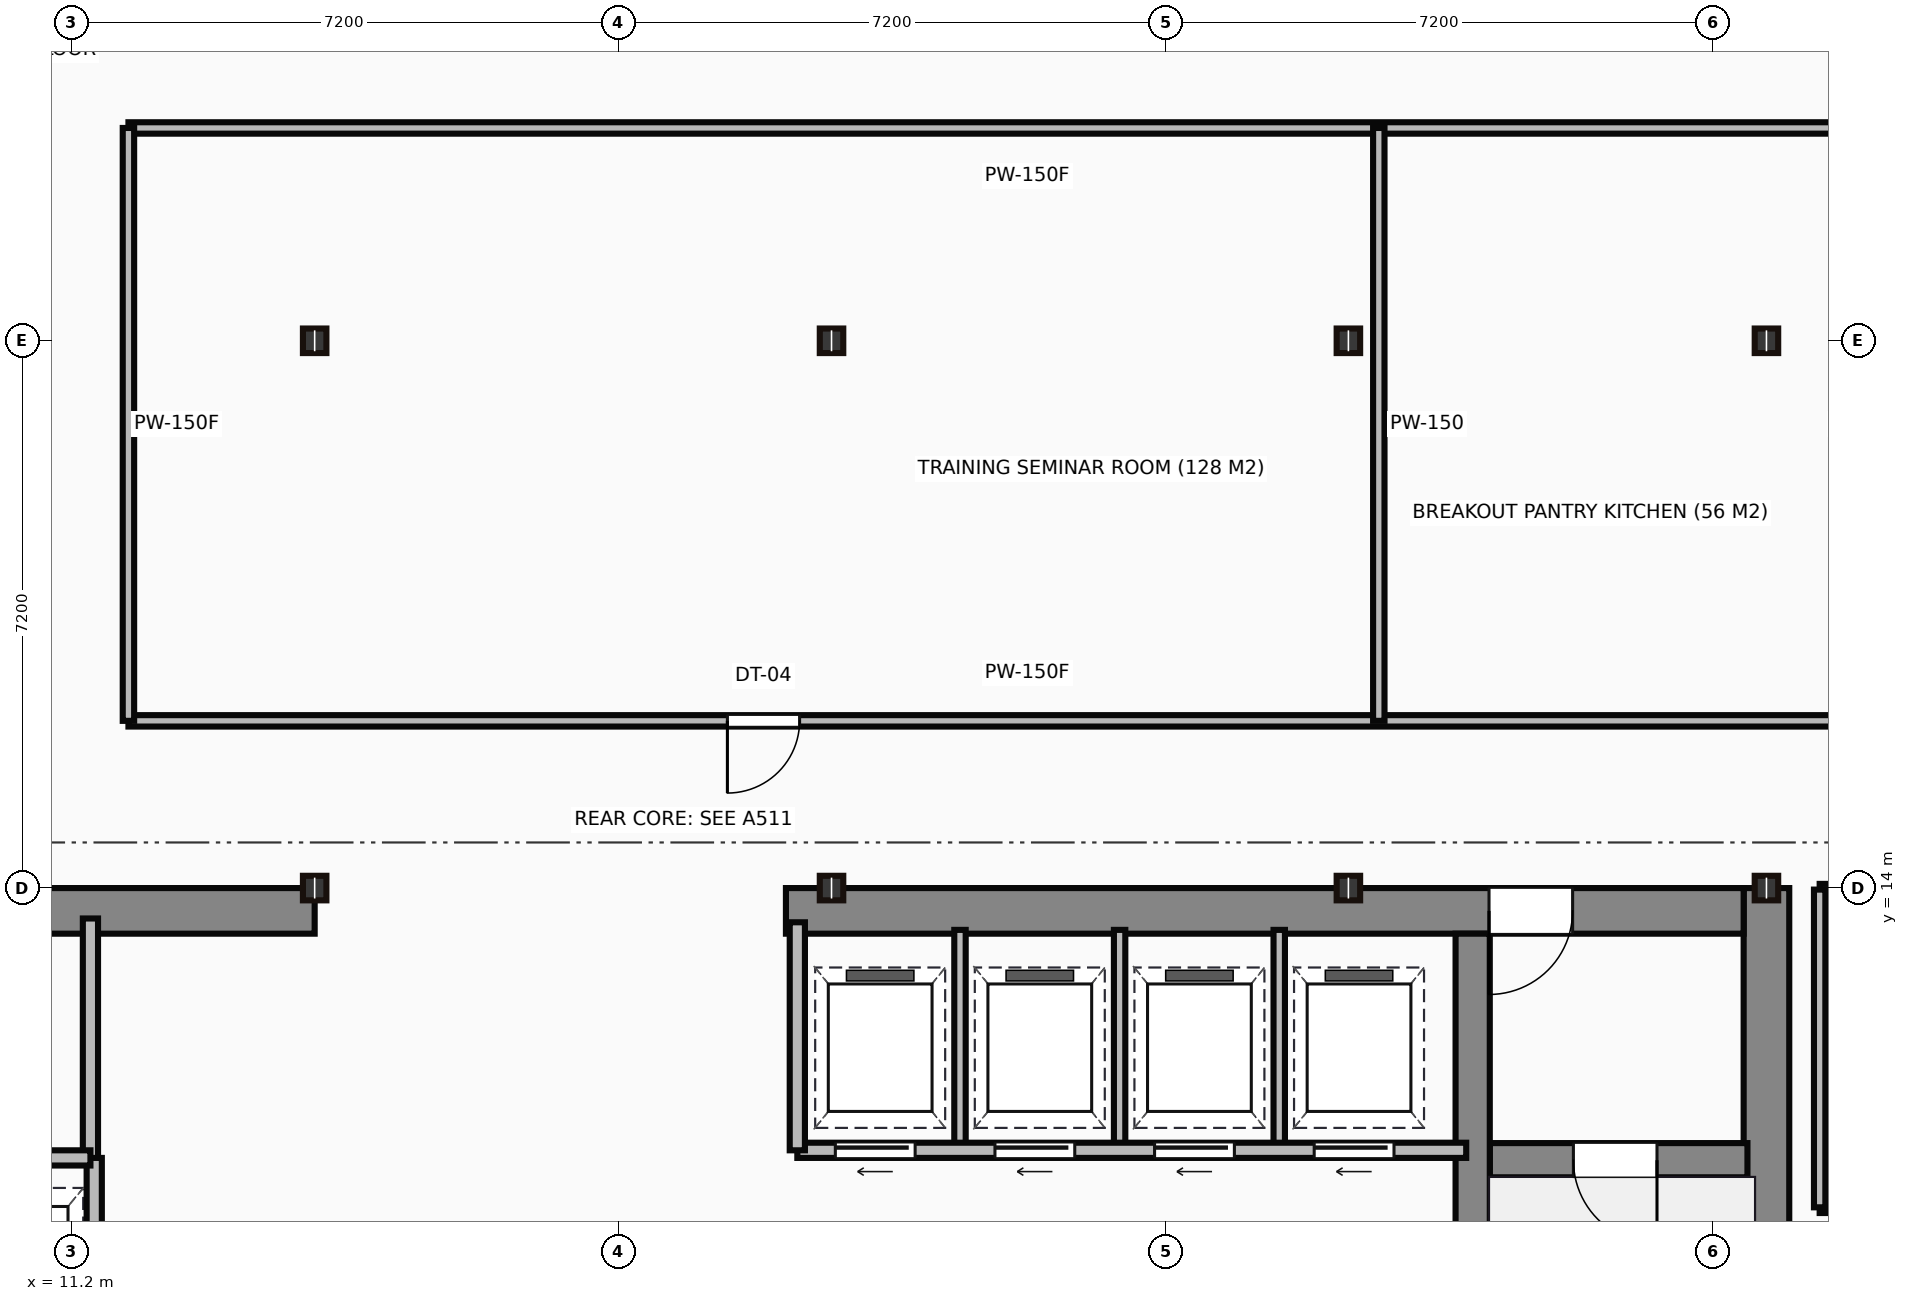
"""IFC4 building model, lengths in metres.
Left out: names, types, materials, properties, quantities, classifications, styles, units other than length and angle.
Written with IfcOpenShell. Run it as: python <this file> out.ifc"""

import sys

from ifc_helpers import new_model, si_unit, direction, frame, frame_2d, origin, origin_2d, place, context, subcontext, project, spatial, rectangle, i_section, extrude, source, transform, mapped, element, fill, save


model = new_model("IFC4")
c1 = context("Model", 3, precision=1e-05, world=origin(), true_north=direction((0.0, 1.0)))
c2 = subcontext(c1, "Body", "Model", "MODEL_VIEW")
j1 = project(units=[si_unit("LENGTHUNIT", "METRE"), si_unit("PLANEANGLEUNIT", "RADIAN")], contexts=[c1])
p1 = place(None, origin())
s1 = spatial("IfcSite", under=j1, at=p1, CompositionType="ELEMENT")
p2 = place(p1, origin())
s2 = spatial("IfcBuilding", under=s1, at=p2, CompositionType="ELEMENT")
p3 = place(p2, frame((0.0, 0.0, 266.1)))
s3 = spatial("IfcBuildingStorey", under=s2, at=p3, CompositionType="ELEMENT", Elevation=266.1)
m1 = source(origin(), c2, "Body", "SweptSolid", [
    extrude(rectangle(XDim=13.1, YDim=0.6, at=frame_2d((6.55, 0.0))), origin(), (0.0, 0.0, 1.0), 3.65),
])
p4 = place(p3, frame((33.5, 0.9, 0.0), z_axis=(0.0, 0.0, 1.0), x_axis=(0.0, 1.0, 0.0)))
e1 = element("IfcWall", 1, at=p4, inside=s3, PredefinedType="SHEAR", context=c2, shape_type="MappedRepresentation", body=[
    mapped(m1, transform((0.0, 0.0, 0.0))),
])
m2 = source(origin(), c2, "Body", "SweptSolid", [
    extrude(rectangle(XDim=9.1, YDim=0.6, at=frame_2d((4.55, 0.0))), origin(), (0.0, 0.0, 1.0), 3.65),
])
p5 = place(p3, frame((5.3, 13.7, 0.0), z_axis=(0.0, 0.0, 1.0), x_axis=(1.0, 0.0, 0.0)))
e2 = element("IfcWall", 2, at=p5, inside=s3, PredefinedType="SHEAR", context=c2, shape_type="MappedRepresentation", body=[
    mapped(m2, transform((0.0, 0.0, 0.0))),
])
p6 = place(p5, frame((4.1, 0.0, 0.0)))
e3 = element("IfcOpeningElement", 3, at=p6, cuts=e2, PredefinedType="OPENING", context=c2, shape_type="SweptSolid", body=[
    extrude(rectangle(XDim=1.1, YDim=2.15, at=frame_2d((0.55, 1.075))), frame((0.0, 0.31, 0.0), z_axis=(0.0, -1.0, 0.0), x_axis=(1.0, 0.0, 0.0)), (0.0, 0.0, 1.0), 0.62),
])
m3 = source(origin(), c2, "Body", "SweptSolid", [
    extrude(rectangle(XDim=12.6, YDim=0.6, at=frame_2d((6.3, 0.0))), origin(), (0.0, 0.0, 1.0), 3.65),
])
p7 = place(p3, frame((20.6, 13.7, 0.0), z_axis=(0.0, 0.0, 1.0), x_axis=(1.0, 0.0, 0.0)))
e4 = element("IfcWall", 4, at=p7, inside=s3, PredefinedType="SHEAR", context=c2, shape_type="MappedRepresentation", body=[
    mapped(m3, transform((0.0, 0.0, 0.0))),
])
p8 = place(p7, frame((9.25, 0.0, 0.0)))
e5 = element("IfcOpeningElement", 5, at=p8, cuts=e4, PredefinedType="OPENING", context=c2, shape_type="SweptSolid", body=[
    extrude(rectangle(XDim=1.1, YDim=2.15, at=frame_2d((0.55, 1.075))), frame((0.0, 0.31, 0.0), z_axis=(0.0, -1.0, 0.0), x_axis=(1.0, 0.0, 0.0)), (0.0, 0.0, 1.0), 0.62),
])
m4 = source(origin(), c2, "Body", "SweptSolid", [
    extrude(rectangle(XDim=12.5, YDim=0.45, at=frame_2d((6.25, 0.0))), origin(), (0.0, 0.0, 1.0), 3.65),
])
p9 = place(p3, frame((29.635, 0.9, 0.0), z_axis=(0.0, 0.0, 1.0), x_axis=(0.0, 1.0, 0.0)))
e6 = element("IfcWall", 6, at=p9, inside=s3, PredefinedType="SHEAR", context=c2, shape_type="MappedRepresentation", body=[
    mapped(m4, transform((0.0, 0.0, 0.0))),
])
m5 = source(origin(), c2, "Body", "SweptSolid", [
    extrude(rectangle(XDim=3.39, YDim=0.45, at=frame_2d((1.695, 0.0))), origin(), (0.0, 0.0, 1.0), 3.65),
])
p10 = place(p3, frame((29.86, 10.42, 0.0), z_axis=(0.0, 0.0, 1.0), x_axis=(1.0, 0.0, 0.0)))
e7 = element("IfcWall", 7, at=p10, inside=s3, PredefinedType="SHEAR", context=c2, shape_type="MappedRepresentation", body=[
    mapped(m5, transform((0.0, 0.0, 0.0))),
])
p11 = place(p10, frame((1.1, 0.0, 0.0)))
e8 = element("IfcOpeningElement", 8, at=p11, cuts=e7, PredefinedType="OPENING", context=c2, shape_type="SweptSolid", body=[
    extrude(rectangle(XDim=1.1, YDim=2.15, at=frame_2d((0.55, 1.075))), frame((0.0, 0.235, 0.0), z_axis=(0.0, -1.0, 0.0), x_axis=(1.0, 0.0, 0.0)), (0.0, 0.0, 1.0), 0.47),
])
m6 = source(origin(), c2, "Body", "SweptSolid", [
    extrude(i_section(OverallWidth=0.309, OverallDepth=0.323, WebThickness=0.014, FlangeThickness=0.023, at=origin_2d()), origin(), (0.0, 0.0, 1.0), 3.65),
])
for number, where, z_axis, x_axis in (
    (9, (14.4, 14.0, 0.0), (0.0, 0.0, 1.0), (1.0, 0.0, 0.0)),
    (10, (14.4, 21.2, 0.0), (0.0, 0.0, 1.0), (1.0, 0.0, 0.0)),
    (11, (21.2, 14.0, 0.0), (0.0, 0.0, 1.0), (1.0, 0.0, 0.0)),
    (12, (21.2, 21.2, 0.0), (0.0, 0.0, 1.0), (1.0, 0.0, 0.0)),
    (13, (28.0, 14.0, 0.0), (0.0, 0.0, 1.0), (1.0, 0.0, 0.0)),
    (14, (28.0, 21.2, 0.0), (0.0, 0.0, 1.0), (1.0, 0.0, 0.0)),
    (15, (33.5, 14.0, 0.0), (0.0, 0.0, 1.0), (1.0, 0.0, 0.0)),
    (16, (33.5, 21.2, 0.0), (0.0, 0.0, 1.0), (1.0, 0.0, 0.0)),
):
    element("IfcColumn", number, at=place(p3, frame(where, z_axis=z_axis, x_axis=x_axis)), inside=s3, PredefinedType="COLUMN", context=c2, shape_type="MappedRepresentation", body=[
        mapped(m6, transform((0.0, 0.0, 0.0))),
    ])
m7 = source(origin(), c2, "Body", "SweptSolid", [
    extrude(rectangle(XDim=3.18, YDim=0.2, at=frame_2d((1.59, 0.0))), origin(), (0.0, 0.0, 1.0), 3.4),
])
p12 = place(p3, frame((11.45, 10.42, 0.0), z_axis=(0.0, 0.0, 1.0), x_axis=(0.0, 1.0, 0.0)))
e17 = element("IfcWall", 17, at=p12, inside=s3, PredefinedType="PARTITIONING", context=c2, shape_type="MappedRepresentation", body=[
    mapped(m7, transform((0.0, 0.0, 0.0))),
])
m8 = source(origin(), c2, "Body", "SweptSolid", [
    extrude(rectangle(XDim=2.35, YDim=0.2, at=frame_2d((1.175, 0.0))), origin(), (0.0, 0.0, 1.0), 3.4),
])
p13 = place(p3, frame((9.1, 10.45, 0.0), z_axis=(0.0, 0.0, 1.0), x_axis=(1.0, 0.0, 0.0)))
e18 = element("IfcWall", 18, at=p13, inside=s3, PredefinedType="PARTITIONING", context=c2, shape_type="MappedRepresentation", body=[
    mapped(m8, transform((0.0, 0.0, 0.0))),
])
p14 = place(p13, frame((0.55, 0.0, 0.0)))
e19 = element("IfcOpeningElement", 19, at=p14, cuts=e18, PredefinedType="OPENING", context=c2, shape_type="SweptSolid", body=[
    extrude(rectangle(XDim=1.1, YDim=2.15, at=frame_2d((0.55, 1.075))), frame((0.0, 0.11, 0.0), z_axis=(0.0, -1.0, 0.0), x_axis=(1.0, 0.0, 0.0)), (0.0, 0.0, 1.0), 0.22),
])
m9 = source(origin(), c2, "Body", "SweptSolid", [
    extrude(rectangle(XDim=9.6, YDim=0.2, at=frame_2d((4.8, 0.0))), origin(), (0.0, 0.0, 1.0), 3.4),
])
p15 = place(p3, frame((11.5, 0.85, 0.0), z_axis=(0.0, 0.0, 1.0), x_axis=(0.0, 1.0, 0.0)))
e20 = element("IfcWall", 20, at=p15, inside=s3, PredefinedType="PARTITIONING", context=c2, shape_type="MappedRepresentation", body=[
    mapped(m9, transform((0.0, 0.0, 0.0))),
])
p16 = place(p15, frame((4.2, 0.0, 0.0)))
e21 = element("IfcOpeningElement", 21, at=p16, cuts=e20, PredefinedType="OPENING", context=c2, shape_type="SweptSolid", body=[
    extrude(rectangle(XDim=1.1, YDim=2.15, at=frame_2d((0.55, 1.075))), frame((0.0, 0.11, 0.0), z_axis=(0.0, -1.0, 0.0), x_axis=(1.0, 0.0, 0.0)), (0.0, 0.0, 1.0), 0.22),
])
p17 = place(p15, frame((0.9, 0.0, 0.0)))
e22 = element("IfcOpeningElement", 22, at=p17, cuts=e20, PredefinedType="OPENING", context=c2, shape_type="SweptSolid", body=[
    extrude(rectangle(XDim=1.2, YDim=2.15, at=frame_2d((0.6, 1.075))), frame((0.0, 0.11, 0.0), z_axis=(0.0, -1.0, 0.0), x_axis=(1.0, 0.0, 0.0)), (0.0, 0.0, 1.0), 0.22),
])
m10 = source(origin(), c2, "Body", "SweptSolid", [
    extrude(rectangle(XDim=8.8, YDim=0.2, at=frame_2d((4.4, 0.0))), origin(), (0.0, 0.0, 1.0), 3.4),
])
p18 = place(p3, frame((20.75, 10.55, 0.0), z_axis=(0.0, 0.0, 1.0), x_axis=(1.0, 0.0, 0.0)))
e23 = element("IfcWall", 23, at=p18, inside=s3, PredefinedType="PARTITIONING", context=c2, shape_type="MappedRepresentation", body=[
    mapped(m10, transform((0.0, 0.0, 0.0))),
])
p19 = place(p18, frame((0.5, 0.0, 0.0)))
e24 = element("IfcOpeningElement", 24, at=p19, cuts=e23, PredefinedType="OPENING", context=c2, shape_type="SweptSolid", body=[
    extrude(rectangle(XDim=1.05, YDim=2.15, at=frame_2d((0.525, 1.075))), frame((0.0, 0.11, 0.0), z_axis=(0.0, -1.0, 0.0), x_axis=(1.0, 0.0, 0.0)), (0.0, 0.0, 1.0), 0.22),
])
p20 = place(p18, frame((2.6, 0.0, 0.0)))
e25 = element("IfcOpeningElement", 25, at=p20, cuts=e23, PredefinedType="OPENING", context=c2, shape_type="SweptSolid", body=[
    extrude(rectangle(XDim=1.05, YDim=2.15, at=frame_2d((0.525, 1.075))), frame((0.0, 0.11, 0.0), z_axis=(0.0, -1.0, 0.0), x_axis=(1.0, 0.0, 0.0)), (0.0, 0.0, 1.0), 0.22),
])
p21 = place(p18, frame((4.7, 0.0, 0.0)))
e26 = element("IfcOpeningElement", 26, at=p21, cuts=e23, PredefinedType="OPENING", context=c2, shape_type="SweptSolid", body=[
    extrude(rectangle(XDim=1.05, YDim=2.15, at=frame_2d((0.525, 1.075))), frame((0.0, 0.11, 0.0), z_axis=(0.0, -1.0, 0.0), x_axis=(1.0, 0.0, 0.0)), (0.0, 0.0, 1.0), 0.22),
])
p22 = place(p18, frame((6.8, 0.0, 0.0)))
e27 = element("IfcOpeningElement", 27, at=p22, cuts=e23, PredefinedType="OPENING", context=c2, shape_type="SweptSolid", body=[
    extrude(rectangle(XDim=1.05, YDim=2.15, at=frame_2d((0.525, 1.075))), frame((0.0, 0.11, 0.0), z_axis=(0.0, -1.0, 0.0), x_axis=(1.0, 0.0, 0.0)), (0.0, 0.0, 1.0), 0.22),
])
m11 = source(origin(), c2, "Body", "SweptSolid", [
    extrude(rectangle(XDim=3.0, YDim=0.2, at=frame_2d((1.5, 0.0))), origin(), (0.0, 0.0, 1.0), 3.4),
])
p23 = place(p3, frame((20.75, 10.55, 0.0), z_axis=(0.0, 0.0, 1.0), x_axis=(0.0, 1.0, 0.0)))
e28 = element("IfcWall", 28, at=p23, inside=s3, PredefinedType="PARTITIONING", context=c2, shape_type="MappedRepresentation", body=[
    mapped(m11, transform((0.0, 0.0, 0.0))),
])
m12 = source(origin(), c2, "Body", "SweptSolid", [
    extrude(rectangle(XDim=2.85, YDim=0.15, at=frame_2d((1.425, 0.0))), origin(), (0.0, 0.0, 1.0), 3.4),
])
for number, where, z_axis, x_axis in (
    (29, (22.89, 10.6, 0.0), (0.0, 0.0, 1.0), (0.0, 1.0, 0.0)),
    (30, (24.99, 10.6, 0.0), (0.0, 0.0, 1.0), (0.0, 1.0, 0.0)),
    (31, (27.09, 10.6, 0.0), (0.0, 0.0, 1.0), (0.0, 1.0, 0.0)),
):
    element("IfcWall", number, at=place(p3, frame(where, z_axis=z_axis, x_axis=x_axis)), inside=s3, PredefinedType="PARTITIONING", context=c2, shape_type="MappedRepresentation", body=[
        mapped(m12, transform((0.0, 0.0, 0.0))),
    ])
m13 = source(origin(), c2, "Body", "SweptSolid", [
    extrude(rectangle(XDim=4.8, YDim=0.15, at=frame_2d((2.4, 0.0))), origin(), (0.0, 0.0, 1.0), 2.787),
])
p24 = place(p3, frame((34.2, 13.98, 0.0), z_axis=(0.0, 0.0, 1.0), x_axis=(1.0, 0.0, 0.0)))
e32 = element("IfcWall", 32, at=p24, inside=s3, PredefinedType="PARTITIONING", context=c2, shape_type="MappedRepresentation", body=[
    mapped(m13, transform((0.0, 0.0, 0.0))),
])
p25 = place(p24, frame((0.35, 0.0, 0.0)))
e33 = element("IfcOpeningElement", 33, at=p25, cuts=e32, PredefinedType="OPENING", context=c2, shape_type="SweptSolid", body=[
    extrude(rectangle(XDim=0.85, YDim=2.1, at=frame_2d((0.425, 1.05))), frame((0.0, 0.085, 0.0), z_axis=(0.0, -1.0, 0.0), x_axis=(1.0, 0.0, 0.0)), (0.0, 0.0, 1.0), 0.17),
])
p26 = place(p24, frame((1.95, 0.0, 0.0)))
e34 = element("IfcOpeningElement", 34, at=p26, cuts=e32, PredefinedType="OPENING", context=c2, shape_type="SweptSolid", body=[
    extrude(rectangle(XDim=0.85, YDim=2.1, at=frame_2d((0.425, 1.05))), frame((0.0, 0.085, 0.0), z_axis=(0.0, -1.0, 0.0), x_axis=(1.0, 0.0, 0.0)), (0.0, 0.0, 1.0), 0.17),
])
p27 = place(p24, frame((3.5, 0.0, 0.0)))
e35 = element("IfcOpeningElement", 35, at=p27, cuts=e32, PredefinedType="OPENING", context=c2, shape_type="SweptSolid", body=[
    extrude(rectangle(XDim=0.9, YDim=2.1, at=frame_2d((0.45, 1.05))), frame((0.0, 0.085, 0.0), z_axis=(0.0, -1.0, 0.0), x_axis=(1.0, 0.0, 0.0)), (0.0, 0.0, 1.0), 0.17),
])
m14 = source(origin(), c2, "Body", "SweptSolid", [
    extrude(rectangle(XDim=4.8, YDim=0.15, at=frame_2d((2.4, 0.0))), origin(), (0.0, 0.0, 1.0), 3.4),
])
p28 = place(p3, frame((34.2, 9.8, 0.0), z_axis=(0.0, 0.0, 1.0), x_axis=(1.0, 0.0, 0.0)))
e36 = element("IfcWall", 36, at=p28, inside=s3, PredefinedType="PARTITIONING", context=c2, shape_type="MappedRepresentation", body=[
    mapped(m14, transform((0.0, 0.0, 0.0))),
])
m15 = source(origin(), c2, "Body", "SweptSolid", [
    extrude(rectangle(XDim=4.18, YDim=0.15, at=frame_2d((2.09, 0.0))), origin(), (0.0, 0.0, 1.0), 3.4),
])
p29 = place(p3, frame((34.2, 9.8, 0.0), z_axis=(0.0, 0.0, 1.0), x_axis=(0.0, 1.0, 0.0)))
e37 = element("IfcWall", 37, at=p29, inside=s3, PredefinedType="PARTITIONING", context=c2, shape_type="MappedRepresentation", body=[
    mapped(m15, transform((0.0, 0.0, 0.0))),
])
m16 = source(origin(), c2, "Body", "SweptSolid", [
    extrude(rectangle(XDim=23.65, YDim=0.15, at=frame_2d((11.825, 0.0))), origin(), (0.0, 0.0, 1.0), 3.4),
])
p30 = place(p3, frame((11.95, 16.2, 0.0), z_axis=(0.0, 0.0, 1.0), x_axis=(1.0, 0.0, 0.0)))
e38 = element("IfcWall", 38, at=p30, inside=s3, PredefinedType="PARTITIONING", context=c2, shape_type="MappedRepresentation", body=[
    mapped(m16, transform((0.0, 0.0, 0.0))),
])
p31 = place(p30, frame((7.88, 0.0, 0.0)))
e39 = element("IfcOpeningElement", 39, at=p31, cuts=e38, PredefinedType="OPENING", context=c2, shape_type="SweptSolid", body=[
    extrude(rectangle(XDim=0.95, YDim=2.15, at=frame_2d((0.475, 1.075))), frame((0.0, 0.085, 0.0), z_axis=(0.0, -1.0, 0.0), x_axis=(1.0, 0.0, 0.0)), (0.0, 0.0, 1.0), 0.17),
])
p32 = place(p3, frame((35.6, 24.0, 0.0), z_axis=(0.0, 0.0, 1.0), x_axis=(-1.0, 0.0, 0.0)))
e40 = element("IfcWall", 40, at=p32, inside=s3, PredefinedType="PARTITIONING", context=c2, shape_type="MappedRepresentation", body=[
    mapped(m16, transform((0.0, 0.0, 0.0))),
])
m17 = source(origin(), c2, "Body", "SweptSolid", [
    extrude(rectangle(XDim=7.8, YDim=0.15, at=frame_2d((3.9, 0.0))), origin(), (0.0, 0.0, 1.0), 3.4),
])
for number, where, z_axis, x_axis in (
    (41, (11.95, 24.0, 0.0), (0.0, 0.0, 1.0), (0.0, -1.0, 0.0)),
    (42, (28.4, 24.0, 0.0), (0.0, 0.0, 1.0), (0.0, -1.0, 0.0)),
):
    element("IfcWall", number, at=place(p3, frame(where, z_axis=z_axis, x_axis=x_axis)), inside=s3, PredefinedType="PARTITIONING", context=c2, shape_type="MappedRepresentation", body=[
        mapped(m17, transform((0.0, 0.0, 0.0))),
    ])
m18 = source(origin(), c2, "Body", "SweptSolid", [
    extrude(rectangle(XDim=1.1, YDim=2.15, at=frame_2d((0.55, 1.075))), frame((0.0, 0.025, 0.0), z_axis=(0.0, -1.0, 0.0), x_axis=(1.0, 0.0, 0.0)), (0.0, 0.0, 1.0), 0.05),
])
p33 = place(p11, frame((1.1, 0.0, 0.0), z_axis=(0.0, 0.0, 1.0), x_axis=(-1.0, 0.0, 0.0)))
e43 = element("IfcDoor", 43, at=p33, inside=s3, OperationType="SINGLE_SWING_RIGHT", PredefinedType="DOOR", context=c2, shape_type="MappedRepresentation", body=[
    mapped(m18, transform((0.0, 0.0, 0.0))),
])
fill(e8, e43)
p34 = place(p8, origin())
e44 = element("IfcDoor", 44, at=p34, inside=s3, OperationType="SINGLE_SWING_LEFT", PredefinedType="DOOR", context=c2, shape_type="MappedRepresentation", body=[
    mapped(m18, transform((0.0, 0.0, 0.0))),
])
fill(e5, e44)
m19 = source(origin(), c2, "Body", "SweptSolid", [
    extrude(rectangle(XDim=1.05, YDim=2.15, at=frame_2d((0.525, 1.075))), frame((0.0, 0.025, 0.0), z_axis=(0.0, -1.0, 0.0), x_axis=(1.0, 0.0, 0.0)), (0.0, 0.0, 1.0), 0.05),
])
p35 = place(p19, frame((1.05, 0.0, 0.0), z_axis=(0.0, 0.0, 1.0), x_axis=(-1.0, 0.0, 0.0)))
e45 = element("IfcDoor", 45, at=p35, inside=s3, OperationType="SLIDING_TO_LEFT", PredefinedType="DOOR", context=c2, shape_type="MappedRepresentation", body=[
    mapped(m19, transform((0.0, 0.0, 0.0))),
])
fill(e24, e45)
p36 = place(p20, frame((1.05, 0.0, 0.0), z_axis=(0.0, 0.0, 1.0), x_axis=(-1.0, 0.0, 0.0)))
e46 = element("IfcDoor", 46, at=p36, inside=s3, OperationType="SLIDING_TO_LEFT", PredefinedType="DOOR", context=c2, shape_type="MappedRepresentation", body=[
    mapped(m19, transform((0.0, 0.0, 0.0))),
])
fill(e25, e46)
p37 = place(p21, frame((1.05, 0.0, 0.0), z_axis=(0.0, 0.0, 1.0), x_axis=(-1.0, 0.0, 0.0)))
e47 = element("IfcDoor", 47, at=p37, inside=s3, OperationType="SLIDING_TO_LEFT", PredefinedType="DOOR", context=c2, shape_type="MappedRepresentation", body=[
    mapped(m19, transform((0.0, 0.0, 0.0))),
])
fill(e26, e47)
p38 = place(p22, frame((1.05, 0.0, 0.0), z_axis=(0.0, 0.0, 1.0), x_axis=(-1.0, 0.0, 0.0)))
e48 = element("IfcDoor", 48, at=p38, inside=s3, OperationType="SLIDING_TO_LEFT", PredefinedType="DOOR", context=c2, shape_type="MappedRepresentation", body=[
    mapped(m19, transform((0.0, 0.0, 0.0))),
])
fill(e27, e48)
m20 = source(origin(), c2, "Body", "SweptSolid", [
    extrude(rectangle(XDim=0.95, YDim=2.15, at=frame_2d((0.475, 1.075))), frame((0.0, 0.025, 0.0), z_axis=(0.0, -1.0, 0.0), x_axis=(1.0, 0.0, 0.0)), (0.0, 0.0, 1.0), 0.05),
])
p39 = place(p31, origin())
e49 = element("IfcDoor", 49, at=p39, inside=s3, OperationType="SINGLE_SWING_LEFT", PredefinedType="DOOR", context=c2, shape_type="MappedRepresentation", body=[
    mapped(m20, transform((0.0, 0.0, 0.0))),
])
fill(e39, e49)
save(model, sys.argv[1])
